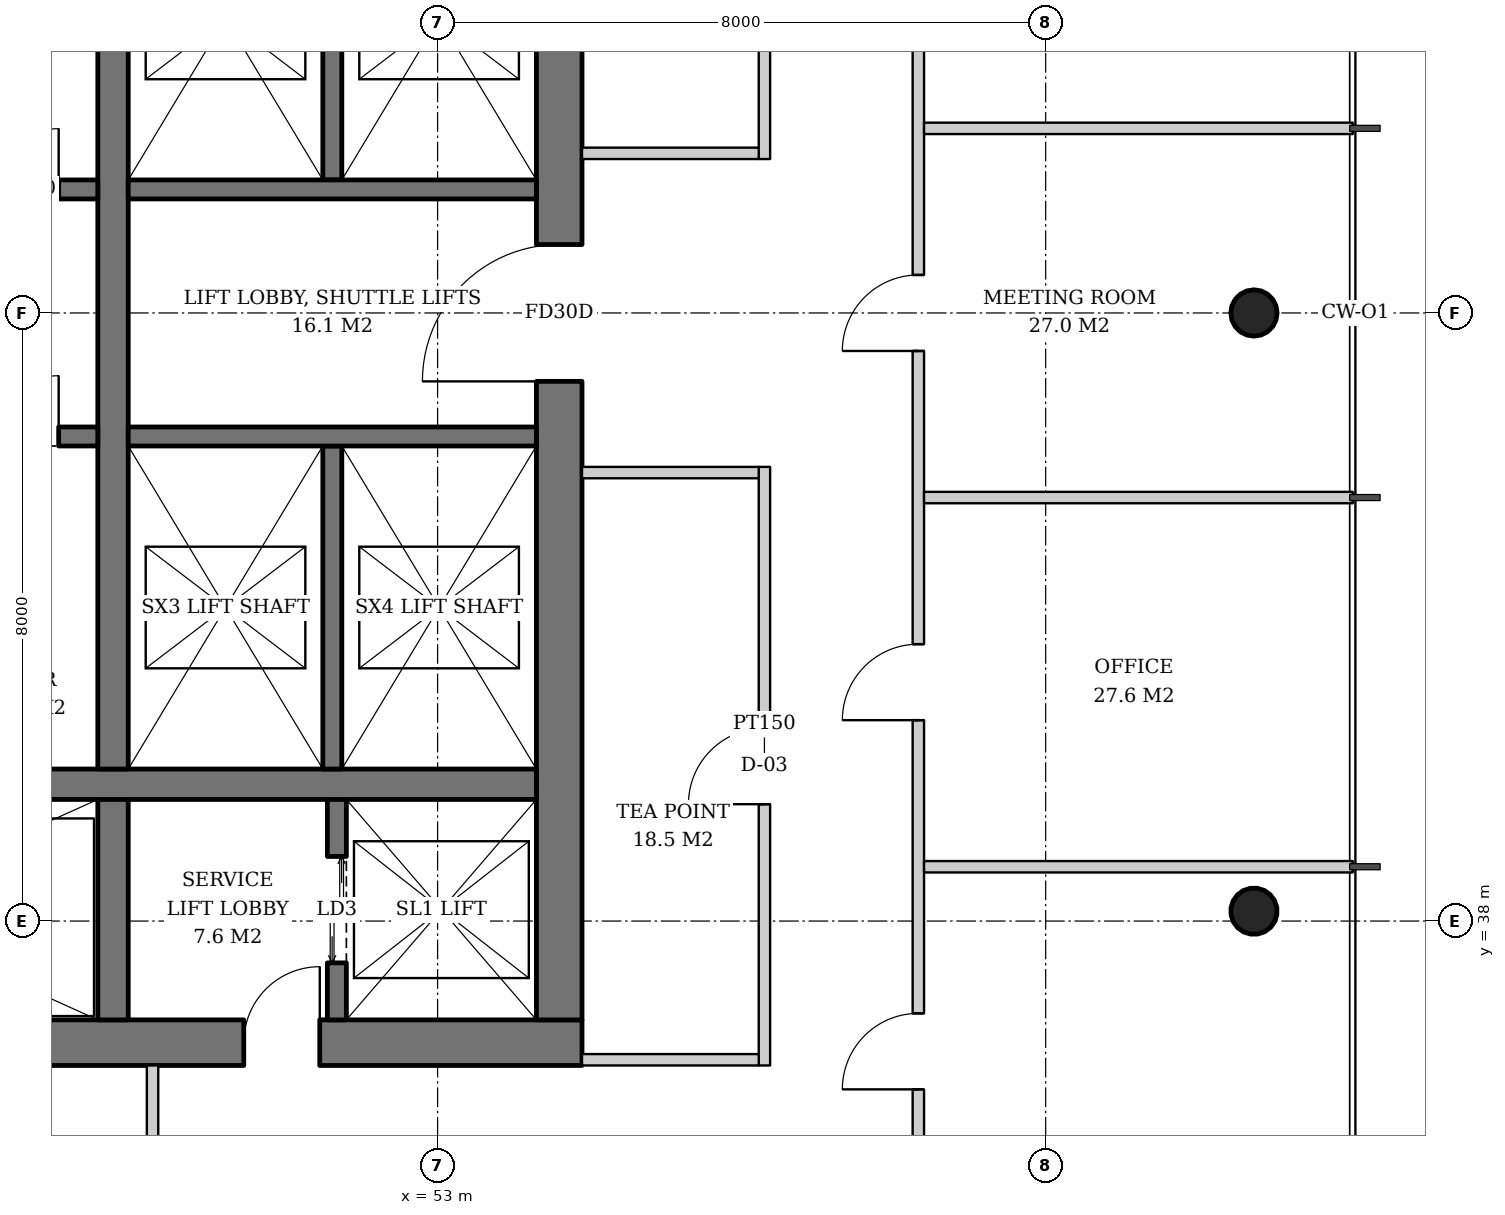
"""IFC4 building model, lengths in metres.
Left out: names, types, materials, properties, quantities, classifications, styles, units other than length and angle.
Written with IfcOpenShell. Run it as: python <this file> out.ifc"""

import sys

from ifc_helpers import new_model, si_unit, direction, frame, frame_2d, origin, origin_2d, place, context, subcontext, project, spatial, rectangle, hollow_circle, extrude, element, fill, save


model = new_model("IFC4")
c1 = context("Model", 3, precision=1e-05, world=origin(), true_north=direction((0.0, 1.0)))
c2 = subcontext(c1, "Body", "Model", "MODEL_VIEW")
j1 = project(units=[si_unit("LENGTHUNIT", "METRE"), si_unit("PLANEANGLEUNIT", "RADIAN")], contexts=[c1])
p1 = place(None, origin())
s1 = spatial("IfcSite", under=j1, at=p1, CompositionType="ELEMENT")
p2 = place(p1, origin())
s2 = spatial("IfcBuilding", under=s1, at=p2, CompositionType="ELEMENT")
p3 = place(p2, frame((0.0, 0.0, 184.4)))
s3 = spatial("IfcBuildingStorey", under=s2, at=p3, CompositionType="ELEMENT", Elevation=184.4)
p4 = place(p3, frame((63.779, 38.111, 0.0), z_axis=(-0.031910269556, 0.015987237665, 0.999362868496), x_axis=(-0.447933021895, -0.894067115991, 0.0)))
e1 = element("IfcColumn", 1, at=p4, inside=s3, PredefinedType="COLUMN", context=c2, shape_type="SweptSolid", body=[
    extrude(hollow_circle(Radius=0.305, WallThickness=0.025, at=origin_2d()), origin(), (0.0, 0.0, 1.0), 3.802),
])
p5 = place(p3, frame((63.779, 46.0, 0.0), z_axis=(-0.031914348339, 0.0, 0.999490607445), x_axis=(0.0, -1.0, 0.0)))
e2 = element("IfcColumn", 2, at=p5, inside=s3, PredefinedType="COLUMN", context=c2, shape_type="SweptSolid", body=[
    extrude(hollow_circle(Radius=0.305, WallThickness=0.025, at=origin_2d()), origin(), (0.0, 0.0, 1.0), 3.802),
])
p6 = place(p3, frame((35.1, 36.4, 0.0), z_axis=(0.0, 0.0, 1.0), x_axis=(1.0, 0.0, 0.0)))
e3 = element("IfcWall", 3, at=p6, inside=s3, PredefinedType="SHEAR", context=c2, shape_type="SweptSolid", body=[
    extrude(rectangle(XDim=19.8, YDim=0.6, at=frame_2d((9.9, 0.0))), origin(), (0.0, 0.0, 1.0), 3.8),
])
p7 = place(p6, frame((3.9, 0.0, 0.0)))
e4 = element("IfcOpeningElement", 4, at=p7, cuts=e3, PredefinedType="OPENING", context=c2, shape_type="SweptSolid", body=[
    extrude(rectangle(XDim=1.0, YDim=2.1, at=frame_2d((0.5, 1.05))), frame((0.0, 0.31, 0.0), z_axis=(0.0, -1.0, 0.0), x_axis=(1.0, 0.0, 0.0)), (0.0, 0.0, 1.0), 0.62),
])
p8 = place(p6, frame((15.35, 0.0, 0.0)))
e5 = element("IfcOpeningElement", 5, at=p8, cuts=e3, PredefinedType="OPENING", context=c2, shape_type="SweptSolid", body=[
    extrude(rectangle(XDim=1.0, YDim=2.1, at=frame_2d((0.5, 1.05))), frame((0.0, 0.31, 0.0), z_axis=(0.0, -1.0, 0.0), x_axis=(1.0, 0.0, 0.0)), (0.0, 0.0, 1.0), 0.62),
])
p9 = place(p3, frame((54.6, 36.7, 0.0), z_axis=(0.0, 0.0, 1.0), x_axis=(0.0, 1.0, 0.0)))
e6 = element("IfcWall", 6, at=p9, inside=s3, PredefinedType="SHEAR", context=c2, shape_type="SweptSolid", body=[
    extrude(rectangle(XDim=18.6, YDim=0.6, at=frame_2d((9.3, 0.0))), origin(), (0.0, 0.0, 1.0), 3.8),
])
p10 = place(p9, frame((8.4, 0.0, 0.0)))
e7 = element("IfcOpeningElement", 7, at=p10, cuts=e6, PredefinedType="OPENING", context=c2, shape_type="SweptSolid", body=[
    extrude(rectangle(XDim=1.8, YDim=2.4, at=frame_2d((0.9, 1.2))), frame((0.0, 0.31, 0.0), z_axis=(0.0, -1.0, 0.0), x_axis=(1.0, 0.0, 0.0)), (0.0, 0.0, 1.0), 0.62),
])
p11 = place(p3, frame((35.7, 39.8, 0.0), z_axis=(0.0, 0.0, 1.0), x_axis=(1.0, 0.0, 0.0)))
e8 = element("IfcWall", 8, at=p11, inside=s3, PredefinedType="SHEAR", context=c2, shape_type="SweptSolid", body=[
    extrude(rectangle(XDim=18.6, YDim=0.4, at=frame_2d((9.3, 0.0))), origin(), (0.0, 0.0, 1.0), 3.8),
])
p12 = place(p3, frame((48.73, 36.7, 0.0), z_axis=(0.0, 0.0, 1.0), x_axis=(0.0, 1.0, 0.0)))
e9 = element("IfcWall", 9, at=p12, inside=s3, PredefinedType="SHEAR", context=c2, shape_type="SweptSolid", body=[
    extrude(rectangle(XDim=2.9, YDim=0.4, at=frame_2d((1.45, 0.0))), origin(), (0.0, 0.0, 1.0), 3.8),
])
p13 = place(p3, frame((48.73, 40.0, 0.0), z_axis=(0.0, 0.0, 1.0), x_axis=(0.0, 1.0, 0.0)))
e10 = element("IfcWall", 10, at=p13, inside=s3, PredefinedType="SHEAR", context=c2, shape_type="SweptSolid", body=[
    extrude(rectangle(XDim=12.0, YDim=0.4, at=frame_2d((6.0, 0.0))), origin(), (0.0, 0.0, 1.0), 3.8),
])
p14 = place(p3, frame((51.675, 36.7, 0.0), z_axis=(0.0, 0.0, 1.0), x_axis=(0.0, 1.0, 0.0)))
e11 = element("IfcWall", 11, at=p14, inside=s3, PredefinedType="SHEAR", context=c2, shape_type="SweptSolid", body=[
    extrude(rectangle(XDim=2.9, YDim=0.25, at=frame_2d((1.45, 0.0))), origin(), (0.0, 0.0, 1.0), 3.8),
])
p15 = place(p14, frame((0.75, 0.0, 0.0)))
e12 = element("IfcOpeningElement", 12, at=p15, cuts=e11, PredefinedType="OPENING", context=c2, shape_type="SweptSolid", body=[
    extrude(rectangle(XDim=1.4, YDim=2.4, at=frame_2d((0.7, 1.2))), frame((0.0, 0.135, 0.0), z_axis=(0.0, -1.0, 0.0), x_axis=(1.0, 0.0, 0.0)), (0.0, 0.0, 1.0), 0.27),
])
p16 = place(p3, frame((35.7, 47.625, 0.0), z_axis=(0.0, 0.0, 1.0), x_axis=(1.0, 0.0, 0.0)))
e13 = element("IfcWall", 13, at=p16, inside=s3, PredefinedType="SHEAR", context=c2, shape_type="SweptSolid", body=[
    extrude(rectangle(XDim=12.83, YDim=0.25, at=frame_2d((6.415, 0.0))), origin(), (0.0, 0.0, 1.0), 3.8),
])
p17 = place(p16, frame((0.7, 0.0, 0.0)))
e14 = element("IfcOpeningElement", 14, at=p17, cuts=e13, PredefinedType="OPENING", context=c2, shape_type="SweptSolid", body=[
    extrude(rectangle(XDim=1.1, YDim=2.2, at=frame_2d((0.55, 1.1))), frame((0.0, 0.135, 0.0), z_axis=(0.0, -1.0, 0.0), x_axis=(1.0, 0.0, 0.0)), (0.0, 0.0, 1.0), 0.27),
])
p18 = place(p16, frame((3.45, 0.0, 0.0)))
e15 = element("IfcOpeningElement", 15, at=p18, cuts=e13, PredefinedType="OPENING", context=c2, shape_type="SweptSolid", body=[
    extrude(rectangle(XDim=1.1, YDim=2.2, at=frame_2d((0.55, 1.1))), frame((0.0, 0.135, 0.0), z_axis=(0.0, -1.0, 0.0), x_axis=(1.0, 0.0, 0.0)), (0.0, 0.0, 1.0), 0.27),
])
p19 = place(p16, frame((6.2, 0.0, 0.0)))
e16 = element("IfcOpeningElement", 16, at=p19, cuts=e13, PredefinedType="OPENING", context=c2, shape_type="SweptSolid", body=[
    extrude(rectangle(XDim=1.1, YDim=2.2, at=frame_2d((0.55, 1.1))), frame((0.0, 0.135, 0.0), z_axis=(0.0, -1.0, 0.0), x_axis=(1.0, 0.0, 0.0)), (0.0, 0.0, 1.0), 0.27),
])
p20 = place(p16, frame((9.0, 0.0, 0.0)))
e17 = element("IfcOpeningElement", 17, at=p20, cuts=e13, PredefinedType="OPENING", context=c2, shape_type="SweptSolid", body=[
    extrude(rectangle(XDim=1.0, YDim=2.1, at=frame_2d((0.5, 1.05))), frame((0.0, 0.135, 0.0), z_axis=(0.0, -1.0, 0.0), x_axis=(1.0, 0.0, 0.0)), (0.0, 0.0, 1.0), 0.27),
])
p21 = place(p16, frame((11.515, 0.0, 0.0)))
e18 = element("IfcOpeningElement", 18, at=p21, cuts=e13, PredefinedType="OPENING", context=c2, shape_type="SweptSolid", body=[
    extrude(rectangle(XDim=0.8, YDim=2.0, at=frame_2d((0.4, 1.0))), frame((0.0, 0.135, 0.0), z_axis=(0.0, -1.0, 0.0), x_axis=(1.0, 0.0, 0.0)), (0.0, 0.0, 1.0), 0.27),
])
p22 = place(p3, frame((35.7, 44.375, 0.0), z_axis=(0.0, 0.0, 1.0), x_axis=(1.0, 0.0, 0.0)))
e19 = element("IfcWall", 19, at=p22, inside=s3, PredefinedType="SHEAR", context=c2, shape_type="SweptSolid", body=[
    extrude(rectangle(XDim=12.83, YDim=0.25, at=frame_2d((6.415, 0.0))), origin(), (0.0, 0.0, 1.0), 3.8),
])
p23 = place(p22, frame((0.7, 0.0, 0.0)))
e20 = element("IfcOpeningElement", 20, at=p23, cuts=e19, PredefinedType="OPENING", context=c2, shape_type="SweptSolid", body=[
    extrude(rectangle(XDim=1.1, YDim=2.2, at=frame_2d((0.55, 1.1))), frame((0.0, 0.135, 0.0), z_axis=(0.0, -1.0, 0.0), x_axis=(1.0, 0.0, 0.0)), (0.0, 0.0, 1.0), 0.27),
])
p24 = place(p22, frame((3.45, 0.0, 0.0)))
e21 = element("IfcOpeningElement", 21, at=p24, cuts=e19, PredefinedType="OPENING", context=c2, shape_type="SweptSolid", body=[
    extrude(rectangle(XDim=1.1, YDim=2.2, at=frame_2d((0.55, 1.1))), frame((0.0, 0.135, 0.0), z_axis=(0.0, -1.0, 0.0), x_axis=(1.0, 0.0, 0.0)), (0.0, 0.0, 1.0), 0.27),
])
p25 = place(p22, frame((6.2, 0.0, 0.0)))
e22 = element("IfcOpeningElement", 22, at=p25, cuts=e19, PredefinedType="OPENING", context=c2, shape_type="SweptSolid", body=[
    extrude(rectangle(XDim=1.1, YDim=2.2, at=frame_2d((0.55, 1.1))), frame((0.0, 0.135, 0.0), z_axis=(0.0, -1.0, 0.0), x_axis=(1.0, 0.0, 0.0)), (0.0, 0.0, 1.0), 0.27),
])
p26 = place(p22, frame((9.0, 0.0, 0.0)))
e23 = element("IfcOpeningElement", 23, at=p26, cuts=e19, PredefinedType="OPENING", context=c2, shape_type="SweptSolid", body=[
    extrude(rectangle(XDim=1.0, YDim=2.1, at=frame_2d((0.5, 1.05))), frame((0.0, 0.135, 0.0), z_axis=(0.0, -1.0, 0.0), x_axis=(1.0, 0.0, 0.0)), (0.0, 0.0, 1.0), 0.27),
])
p27 = place(p22, frame((11.515, 0.0, 0.0)))
e24 = element("IfcOpeningElement", 24, at=p27, cuts=e19, PredefinedType="OPENING", context=c2, shape_type="SweptSolid", body=[
    extrude(rectangle(XDim=0.8, YDim=2.0, at=frame_2d((0.4, 1.0))), frame((0.0, 0.135, 0.0), z_axis=(0.0, -1.0, 0.0), x_axis=(1.0, 0.0, 0.0)), (0.0, 0.0, 1.0), 0.27),
])
p28 = place(p3, frame((51.615, 47.75, 0.0), z_axis=(0.0, 0.0, 1.0), x_axis=(0.0, 1.0, 0.0)))
e25 = element("IfcWall", 25, at=p28, inside=s3, PredefinedType="SHEAR", context=c2, shape_type="SweptSolid", body=[
    extrude(rectangle(XDim=4.25, YDim=0.25, at=frame_2d((2.125, 0.0))), origin(), (0.0, 0.0, 1.0), 3.8),
])
p29 = place(p3, frame((48.93, 47.625, 0.0), z_axis=(0.0, 0.0, 1.0), x_axis=(1.0, 0.0, 0.0)))
e26 = element("IfcWall", 26, at=p29, inside=s3, PredefinedType="SHEAR", context=c2, shape_type="SweptSolid", body=[
    extrude(rectangle(XDim=5.37, YDim=0.25, at=frame_2d((2.685, 0.0))), origin(), (0.0, 0.0, 1.0), 3.8),
])
p30 = place(p3, frame((51.615, 44.25, 0.0), z_axis=(0.0, 0.0, 1.0), x_axis=(0.0, -1.0, 0.0)))
e27 = element("IfcWall", 27, at=p30, inside=s3, PredefinedType="SHEAR", context=c2, shape_type="SweptSolid", body=[
    extrude(rectangle(XDim=4.25, YDim=0.25, at=frame_2d((2.125, 0.0))), origin(), (0.0, 0.0, 1.0), 3.8),
])
p31 = place(p3, frame((48.93, 44.375, 0.0), z_axis=(0.0, 0.0, 1.0), x_axis=(1.0, 0.0, 0.0)))
e28 = element("IfcWall", 28, at=p31, inside=s3, PredefinedType="SHEAR", context=c2, shape_type="SweptSolid", body=[
    extrude(rectangle(XDim=5.37, YDim=0.25, at=frame_2d((2.685, 0.0))), origin(), (0.0, 0.0, 1.0), 3.8),
])
p32 = place(p3, frame((57.3, 36.1, 0.0), z_axis=(0.0, 0.0, 1.0), x_axis=(0.0, 1.0, 0.0)))
e29 = element("IfcWall", 29, at=p32, inside=s3, PredefinedType="PARTITIONING", context=c2, shape_type="SweptSolid", body=[
    extrude(rectangle(XDim=7.875, YDim=0.15, at=frame_2d((3.938, 0.0))), origin(), (0.0, 0.0, 1.0), 2.867),
])
p33 = place(p32, frame((3.438, 0.0, 0.0)))
e30 = element("IfcOpeningElement", 30, at=p33, cuts=e29, PredefinedType="OPENING", context=c2, shape_type="SweptSolid", body=[
    extrude(rectangle(XDim=1.0, YDim=2.1, at=frame_2d((0.5, 1.05))), frame((0.0, 0.085, 0.0), z_axis=(0.0, -1.0, 0.0), x_axis=(1.0, 0.0, 0.0)), (0.0, 0.0, 1.0), 0.17),
])
p34 = place(p3, frame((54.9, 36.175, 0.0), z_axis=(0.0, 0.0, 1.0), x_axis=(1.0, 0.0, 0.0)))
e31 = element("IfcWall", 31, at=p34, inside=s3, PredefinedType="PARTITIONING", context=c2, shape_type="SweptSolid", body=[
    extrude(rectangle(XDim=2.325, YDim=0.15, at=frame_2d((1.163, 0.0))), origin(), (0.0, 0.0, 1.0), 2.867),
])
p35 = place(p3, frame((54.9, 43.9, 0.0), z_axis=(0.0, 0.0, 1.0), x_axis=(1.0, 0.0, 0.0)))
e32 = element("IfcWall", 32, at=p35, inside=s3, PredefinedType="PARTITIONING", context=c2, shape_type="SweptSolid", body=[
    extrude(rectangle(XDim=2.325, YDim=0.15, at=frame_2d((1.163, 0.0))), origin(), (0.0, 0.0, 1.0), 3.62),
])
p36 = place(p3, frame((57.3, 48.025, 0.0), z_axis=(0.0, 0.0, 1.0), x_axis=(0.0, 1.0, 0.0)))
e33 = element("IfcWall", 33, at=p36, inside=s3, PredefinedType="PARTITIONING", context=c2, shape_type="SweptSolid", body=[
    extrude(rectangle(XDim=7.875, YDim=0.15, at=frame_2d((3.938, 0.0))), origin(), (0.0, 0.0, 1.0), 2.867),
])
p37 = place(p36, frame((3.438, 0.0, 0.0)))
e34 = element("IfcOpeningElement", 34, at=p37, cuts=e33, PredefinedType="OPENING", context=c2, shape_type="SweptSolid", body=[
    extrude(rectangle(XDim=1.0, YDim=2.1, at=frame_2d((0.5, 1.05))), frame((0.0, 0.085, 0.0), z_axis=(0.0, -1.0, 0.0), x_axis=(1.0, 0.0, 0.0)), (0.0, 0.0, 1.0), 0.17),
])
for number, where, z_axis, x_axis in (
    (35, (54.9, 48.1, 0.0), (0.0, 0.0, 1.0), (1.0, 0.0, 0.0)),
    (36, (49.25, 36.1, 0.0), (0.0, 0.0, 1.0), (0.0, -1.0, 0.0)),
):
    element("IfcWall", number, at=place(p3, frame(where, z_axis=z_axis, x_axis=x_axis)), inside=s3, PredefinedType="PARTITIONING", context=c2, shape_type="SweptSolid", body=[
        extrude(rectangle(XDim=2.325, YDim=0.15, at=frame_2d((1.163, 0.0))), origin(), (0.0, 0.0, 1.0), 3.62),
    ])
p38 = place(p3, frame((59.325, 32.7, 0.0), z_axis=(0.0, 0.0, 1.0), x_axis=(0.0, 1.0, 0.0)))
e37 = element("IfcWall", 37, at=p38, inside=s3, PredefinedType="PARTITIONING", context=c2, shape_type="SweptSolid", body=[
    extrude(rectangle(XDim=26.6, YDim=0.15, at=frame_2d((13.3, 0.0))), origin(), (0.0, 0.0, 1.0), 2.867),
])
p39 = place(p38, frame((3.086, 0.0, 0.0)))
e38 = element("IfcOpeningElement", 38, at=p39, cuts=e37, PredefinedType="OPENING", context=c2, shape_type="SweptSolid", body=[
    extrude(rectangle(XDim=1.0, YDim=2.1, at=frame_2d((0.5, 1.05))), frame((0.0, 0.085, 0.0), z_axis=(0.0, -1.0, 0.0), x_axis=(1.0, 0.0, 0.0)), (0.0, 0.0, 1.0), 0.17),
])
p40 = place(p38, frame((7.943, 0.0, 0.0)))
e39 = element("IfcOpeningElement", 39, at=p40, cuts=e37, PredefinedType="OPENING", context=c2, shape_type="SweptSolid", body=[
    extrude(rectangle(XDim=1.0, YDim=2.1, at=frame_2d((0.5, 1.05))), frame((0.0, 0.085, 0.0), z_axis=(0.0, -1.0, 0.0), x_axis=(1.0, 0.0, 0.0)), (0.0, 0.0, 1.0), 0.17),
])
p41 = place(p38, frame((12.8, 0.0, 0.0)))
e40 = element("IfcOpeningElement", 40, at=p41, cuts=e37, PredefinedType="OPENING", context=c2, shape_type="SweptSolid", body=[
    extrude(rectangle(XDim=1.0, YDim=2.1, at=frame_2d((0.5, 1.05))), frame((0.0, 0.085, 0.0), z_axis=(0.0, -1.0, 0.0), x_axis=(1.0, 0.0, 0.0)), (0.0, 0.0, 1.0), 0.17),
])
p42 = place(p38, frame((17.657, 0.0, 0.0)))
e41 = element("IfcOpeningElement", 41, at=p42, cuts=e37, PredefinedType="OPENING", context=c2, shape_type="SweptSolid", body=[
    extrude(rectangle(XDim=1.0, YDim=2.1, at=frame_2d((0.5, 1.05))), frame((0.0, 0.085, 0.0), z_axis=(0.0, -1.0, 0.0), x_axis=(1.0, 0.0, 0.0)), (0.0, 0.0, 1.0), 0.17),
])
for number, where, z_axis, x_axis in (
    (42, (59.4, 38.714, 0.0), (0.0, 0.0, 1.0), (1.0, 0.0, 0.0)),
    (43, (59.4, 43.572, 0.0), (0.0, 0.0, 1.0), (1.0, 0.0, 0.0)),
):
    element("IfcWall", number, at=place(p3, frame(where, z_axis=z_axis, x_axis=x_axis)), inside=s3, PredefinedType="PARTITIONING", context=c2, shape_type="SweptSolid", body=[
        extrude(rectangle(XDim=5.64, YDim=0.15, at=frame_2d((2.82, 0.0))), origin(), (0.0, 0.0, 1.0), 3.12),
    ])
p43 = place(p3, frame((59.4, 48.428, 0.0), z_axis=(0.0, 0.0, 1.0), x_axis=(1.0, 0.0, 0.0)))
e44 = element("IfcWall", 44, at=p43, inside=s3, PredefinedType="PARTITIONING", context=c2, shape_type="SweptSolid", body=[
    extrude(rectangle(XDim=5.64, YDim=0.15, at=frame_2d((2.82, 0.0))), origin(), (0.0, 0.0, 1.0), 2.867),
])
p44 = place(p15, origin())
e45 = element("IfcDoor", 45, at=p44, inside=s3, OperationType="DOUBLE_DOOR_SLIDING", PredefinedType="DOOR", context=c2, shape_type="SweptSolid", body=[
    extrude(rectangle(XDim=1.4, YDim=2.4, at=frame_2d((0.7, 1.2))), frame((0.0, 0.025, 0.0), z_axis=(0.0, -1.0, 0.0), x_axis=(1.0, 0.0, 0.0)), (0.0, 0.0, 1.0), 0.05),
])
fill(e12, e45)
p45 = place(p21, origin())
e46 = element("IfcDoor", 46, at=p45, inside=s3, OperationType="SINGLE_SWING_RIGHT", PredefinedType="DOOR", context=c2, shape_type="SweptSolid", body=[
    extrude(rectangle(XDim=0.8, YDim=2.0, at=frame_2d((0.4, 1.0))), frame((0.0, 0.025, 0.0), z_axis=(0.0, -1.0, 0.0), x_axis=(1.0, 0.0, 0.0)), (0.0, 0.0, 1.0), 0.05),
])
fill(e18, e46)
p46 = place(p27, origin())
e47 = element("IfcDoor", 47, at=p46, inside=s3, OperationType="SINGLE_SWING_RIGHT", PredefinedType="DOOR", context=c2, shape_type="SweptSolid", body=[
    extrude(rectangle(XDim=0.8, YDim=2.0, at=frame_2d((0.4, 1.0))), frame((0.0, 0.025, 0.0), z_axis=(0.0, -1.0, 0.0), x_axis=(1.0, 0.0, 0.0)), (0.0, 0.0, 1.0), 0.05),
])
fill(e24, e47)
p47 = place(p10, origin())
e48 = element("IfcDoor", 48, at=p47, inside=s3, OperationType="DOUBLE_DOOR_SINGLE_SWING", PredefinedType="DOOR", context=c2, shape_type="SweptSolid", body=[
    extrude(rectangle(XDim=1.8, YDim=2.4, at=frame_2d((0.9, 1.2))), frame((0.0, 0.025, 0.0), z_axis=(0.0, -1.0, 0.0), x_axis=(1.0, 0.0, 0.0)), (0.0, 0.0, 1.0), 0.05),
])
fill(e7, e48)
p48 = place(p8, origin())
e49 = element("IfcDoor", 49, at=p48, inside=s3, OperationType="SINGLE_SWING_RIGHT", PredefinedType="DOOR", context=c2, shape_type="SweptSolid", body=[
    extrude(rectangle(XDim=1.0, YDim=2.1, at=frame_2d((0.5, 1.05))), frame((0.0, 0.025, 0.0), z_axis=(0.0, -1.0, 0.0), x_axis=(1.0, 0.0, 0.0)), (0.0, 0.0, 1.0), 0.05),
])
fill(e5, e49)
p49 = place(p33, origin())
e50 = element("IfcDoor", 50, at=p49, inside=s3, OperationType="SINGLE_SWING_LEFT", PredefinedType="DOOR", context=c2, shape_type="SweptSolid", body=[
    extrude(rectangle(XDim=1.0, YDim=2.1, at=frame_2d((0.5, 1.05))), frame((0.0, 0.025, 0.0), z_axis=(0.0, -1.0, 0.0), x_axis=(1.0, 0.0, 0.0)), (0.0, 0.0, 1.0), 0.05),
])
fill(e30, e50)
p50 = place(p39, origin())
e51 = element("IfcDoor", 51, at=p50, inside=s3, OperationType="SINGLE_SWING_LEFT", PredefinedType="DOOR", context=c2, shape_type="SweptSolid", body=[
    extrude(rectangle(XDim=1.0, YDim=2.1, at=frame_2d((0.5, 1.05))), frame((0.0, 0.025, 0.0), z_axis=(0.0, -1.0, 0.0), x_axis=(1.0, 0.0, 0.0)), (0.0, 0.0, 1.0), 0.05),
])
fill(e38, e51)
p51 = place(p40, origin())
e52 = element("IfcDoor", 52, at=p51, inside=s3, OperationType="SINGLE_SWING_LEFT", PredefinedType="DOOR", context=c2, shape_type="SweptSolid", body=[
    extrude(rectangle(XDim=1.0, YDim=2.1, at=frame_2d((0.5, 1.05))), frame((0.0, 0.025, 0.0), z_axis=(0.0, -1.0, 0.0), x_axis=(1.0, 0.0, 0.0)), (0.0, 0.0, 1.0), 0.05),
])
fill(e39, e52)
p52 = place(p41, origin())
e53 = element("IfcDoor", 53, at=p52, inside=s3, OperationType="SINGLE_SWING_LEFT", PredefinedType="DOOR", context=c2, shape_type="SweptSolid", body=[
    extrude(rectangle(XDim=1.0, YDim=2.1, at=frame_2d((0.5, 1.05))), frame((0.0, 0.025, 0.0), z_axis=(0.0, -1.0, 0.0), x_axis=(1.0, 0.0, 0.0)), (0.0, 0.0, 1.0), 0.05),
])
fill(e40, e53)
save(model, sys.argv[1])
